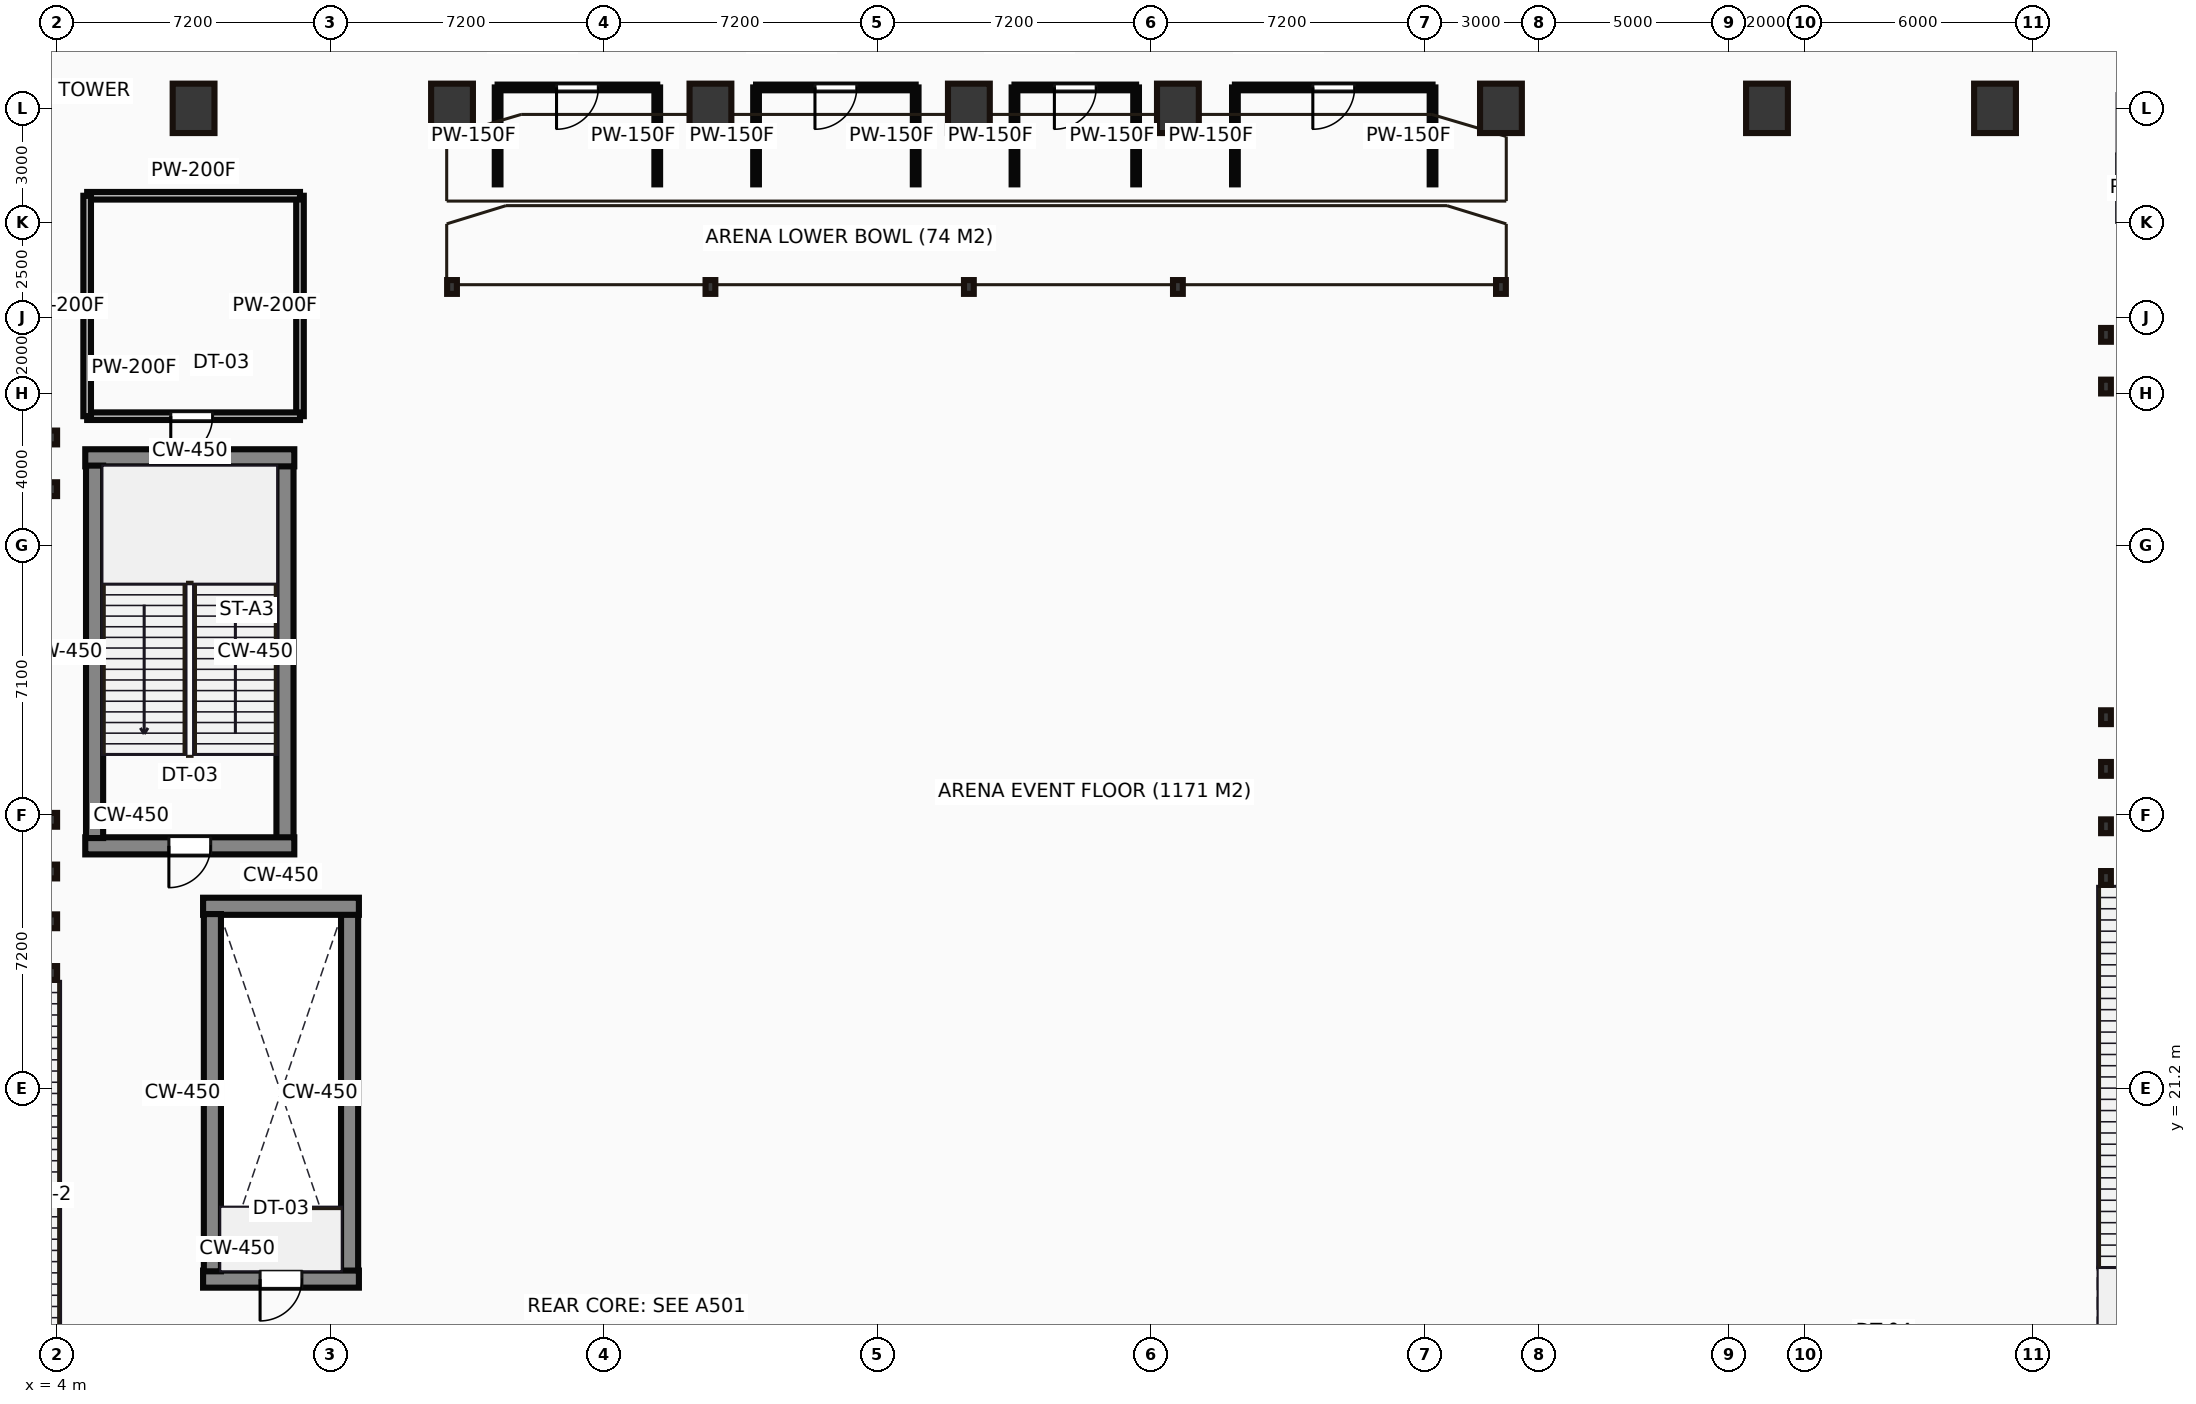
"""IFC4 building model, lengths in metres.
Left out: names, types, materials, properties, quantities, classifications, styles, units other than length and angle.
Written with IfcOpenShell. Run it as: python <this file> out.ifc"""

import sys

from ifc_helpers import new_model, si_unit, direction, frame, frame_2d, origin, origin_2d, place, context, subcontext, project, spatial, rectangle, hollow_rectangle, i_section, extrude, source, transform, mapped, element, fill, save


model = new_model("IFC4")
c1 = context("Model", 3, precision=1e-05, world=origin(), true_north=direction((0.0, 1.0)))
c2 = subcontext(c1, "Body", "Model", "MODEL_VIEW")
j1 = project(units=[si_unit("LENGTHUNIT", "METRE"), si_unit("PLANEANGLEUNIT", "RADIAN")], contexts=[c1])
p1 = place(None, origin())
s1 = spatial("IfcSite", under=j1, at=p1, CompositionType="ELEMENT")
p2 = place(p1, origin())
s2 = spatial("IfcBuilding", under=s1, at=p2, CompositionType="ELEMENT")
p3 = place(p2, origin())
s3 = spatial("IfcBuildingStorey", under=s2, at=p3, CompositionType="ELEMENT", Elevation=0.0)
m1 = source(origin(), c2, "Body", "SweptSolid", [
    extrude(hollow_rectangle(XDim=1.1, YDim=1.3, WallThickness=0.055, at=origin_2d()), origin(), (0.0, 0.0, 1.0), 6.0),
])
for number, where, z_axis, x_axis in (
    (1, (7.6, 47.0, 0.0), (0.0, 0.0, 1.0), (1.0, 0.0, 0.0)),
    (2, (14.4, 47.0, 0.0), (0.0, 0.0, 1.0), (1.0, 0.0, 0.0)),
    (3, (21.2, 47.0, 0.0), (0.0, 0.0, 1.0), (1.0, 0.0, 0.0)),
    (4, (28.0, 47.0, 0.0), (0.0, 0.0, 1.0), (1.0, 0.0, 0.0)),
    (5, (33.5, 47.0, 0.0), (0.0, 0.0, 1.0), (1.0, 0.0, 0.0)),
    (6, (42.0, 47.0, 0.0), (0.0, 0.0, 1.0), (1.0, 0.0, 0.0)),
    (7, (49.0, 47.0, 0.0), (0.0, 0.0, 1.0), (1.0, 0.0, 0.0)),
    (8, (55.0, 47.0, 0.0), (0.0, 0.0, 1.0), (1.0, 0.0, 0.0)),
):
    element("IfcColumn", number, at=place(p3, frame(where, z_axis=z_axis, x_axis=x_axis)), inside=s3, PredefinedType="PILASTER", context=c2, shape_type="MappedRepresentation", body=[
        mapped(m1, transform((0.0, 0.0, 0.0))),
    ])
m2 = source(origin(), c2, "Body", "SweptSolid", [
    extrude(i_section(OverallWidth=0.257, OverallDepth=0.363, WebThickness=0.013, FlangeThickness=0.022, at=origin_2d()), origin(), (0.0, 0.0, 1.0), 6.0),
])
for number, where, z_axis, x_axis in (
    (9, (14.4, 42.3, 0.0), (0.0, 0.0, 1.0), (1.0, 0.0, 0.0)),
    (10, (21.2, 42.3, 0.0), (0.0, 0.0, 1.0), (1.0, 0.0, 0.0)),
    (11, (28.0, 42.3, 0.0), (0.0, 0.0, 1.0), (1.0, 0.0, 0.0)),
    (12, (33.5, 42.3, 0.0), (0.0, 0.0, 1.0), (1.0, 0.0, 0.0)),
    (13, (42.0, 42.3, 0.0), (0.0, 0.0, 1.0), (1.0, 0.0, 0.0)),
):
    element("IfcColumn", number, at=place(p3, frame(where, z_axis=z_axis, x_axis=x_axis)), inside=s3, PredefinedType="COLUMN", context=c2, shape_type="MappedRepresentation", body=[
        mapped(m2, transform((0.0, 0.0, 0.0))),
    ])
m3 = source(origin(), c2, "Body", "SweptSolid", [
    extrude(rectangle(XDim=5.5, YDim=0.45, at=frame_2d((2.75, 0.0))), origin(), (0.0, 0.0, 1.0), 6.0),
])
p4 = place(p3, frame((4.75, 27.595, 0.0), z_axis=(0.0, 0.0, 1.0), x_axis=(1.0, 0.0, 0.0)))
e14 = element("IfcWall", 14, at=p4, inside=s3, PredefinedType="SHEAR", context=c2, shape_type="MappedRepresentation", body=[
    mapped(m3, transform((0.0, 0.0, 0.0))),
])
p5 = place(p4, frame((2.2, 0.0, 0.0)))
e15 = element("IfcOpeningElement", 15, at=p5, cuts=e14, PredefinedType="OPENING", context=c2, shape_type="SweptSolid", body=[
    extrude(rectangle(XDim=1.1, YDim=2.15, at=frame_2d((0.55, 1.075))), frame((0.0, 0.235, 0.0), z_axis=(0.0, -1.0, 0.0), x_axis=(1.0, 0.0, 0.0)), (0.0, 0.0, 1.0), 0.47),
])
m4 = source(origin(), c2, "Body", "SweptSolid", [
    extrude(rectangle(XDim=9.8, YDim=0.45, at=frame_2d((4.9, 0.0))), origin(), (0.0, 0.0, 1.0), 6.0),
])
for number, where, z_axis, x_axis in (
    (16, (4.995, 27.8, 0.0), (0.0, 0.0, 1.0), (0.0, 1.0, 0.0)),
    (17, (10.005, 27.8, 0.0), (0.0, 0.0, 1.0), (0.0, 1.0, 0.0)),
):
    element("IfcWall", number, at=place(p3, frame(where, z_axis=z_axis, x_axis=x_axis)), inside=s3, PredefinedType="SHEAR", context=c2, shape_type="MappedRepresentation", body=[
        mapped(m4, transform((0.0, 0.0, 0.0))),
    ])
p6 = place(p3, frame((4.75, 37.805, 0.0), z_axis=(0.0, 0.0, 1.0), x_axis=(1.0, 0.0, 0.0)))
e18 = element("IfcWall", 18, at=p6, inside=s3, PredefinedType="SHEAR", context=c2, shape_type="MappedRepresentation", body=[
    mapped(m3, transform((0.0, 0.0, 0.0))),
])
m5 = source(origin(), c2, "Body", "SweptSolid", [
    extrude(rectangle(XDim=4.1, YDim=0.45, at=frame_2d((2.05, 0.0))), origin(), (0.0, 0.0, 1.0), 5.7),
])
p7 = place(p3, frame((7.85, 16.195, 0.0), z_axis=(0.0, 0.0, 1.0), x_axis=(1.0, 0.0, 0.0)))
e19 = element("IfcWall", 19, at=p7, inside=s3, PredefinedType="SHEAR", context=c2, shape_type="MappedRepresentation", body=[
    mapped(m5, transform((0.0, 0.0, 0.0))),
])
p8 = place(p7, frame((1.5, 0.0, 0.0)))
e20 = element("IfcOpeningElement", 20, at=p8, cuts=e19, PredefinedType="OPENING", context=c2, shape_type="SweptSolid", body=[
    extrude(rectangle(XDim=1.1, YDim=2.15, at=frame_2d((0.55, 1.075))), frame((0.0, 0.235, 0.0), z_axis=(0.0, -1.0, 0.0), x_axis=(1.0, 0.0, 0.0)), (0.0, 0.0, 1.0), 0.47),
])
m6 = source(origin(), c2, "Body", "SweptSolid", [
    extrude(rectangle(XDim=9.4, YDim=0.45, at=frame_2d((4.7, 0.0))), origin(), (0.0, 0.0, 1.0), 5.7),
])
for number, where, z_axis, x_axis in (
    (21, (8.095, 16.4, 0.0), (0.0, 0.0, 1.0), (0.0, 1.0, 0.0)),
    (22, (11.705, 16.4, 0.0), (0.0, 0.0, 1.0), (0.0, 1.0, 0.0)),
):
    element("IfcWall", number, at=place(p3, frame(where, z_axis=z_axis, x_axis=x_axis)), inside=s3, PredefinedType="SHEAR", context=c2, shape_type="MappedRepresentation", body=[
        mapped(m6, transform((0.0, 0.0, 0.0))),
    ])
p9 = place(p3, frame((7.85, 26.005, 0.0), z_axis=(0.0, 0.0, 1.0), x_axis=(1.0, 0.0, 0.0)))
e23 = element("IfcWall", 23, at=p9, inside=s3, PredefinedType="SHEAR", context=c2, shape_type="MappedRepresentation", body=[
    mapped(m5, transform((0.0, 0.0, 0.0))),
])
m7 = source(origin(), c2, "Body", "SweptSolid", [
    extrude(i_section(OverallWidth=0.257, OverallDepth=0.363, WebThickness=0.013, FlangeThickness=0.022, at=origin_2d()), origin(), (0.0, 0.0, 1.0), 5.8),
])
for number, where, z_axis, x_axis in (
    (24, (3.88, 24.25, 0.0), (0.0, 0.0, 1.0), (1.0, 0.0, 0.0)),
    (25, (3.88, 25.61, 0.0), (0.0, 0.0, 1.0), (1.0, 0.0, 0.0)),
    (26, (3.88, 26.92, 0.0), (0.0, 0.0, 1.0), (1.0, 0.0, 0.0)),
    (27, (3.88, 28.28, 0.0), (0.0, 0.0, 1.0), (1.0, 0.0, 0.0)),
):
    element("IfcColumn", number, at=place(p3, frame(where, z_axis=z_axis, x_axis=x_axis)), inside=s3, PredefinedType="COLUMN", context=c2, shape_type="MappedRepresentation", body=[
        mapped(m7, transform((0.0, 0.0, 0.0))),
    ])
for number, where, z_axis, x_axis in (
    (28, (3.88, 36.98, 0.0), (0.0, 0.0, 1.0), (1.0, 0.0, 0.0)),
    (29, (3.88, 38.34, 0.0), (0.0, 0.0, 1.0), (1.0, 0.0, 0.0)),
):
    element("IfcColumn", number, at=place(p3, frame(where, z_axis=z_axis, x_axis=x_axis)), inside=s3, PredefinedType="COLUMN", context=c2, shape_type="MappedRepresentation", body=[
        mapped(m2, transform((0.0, 0.0, 0.0))),
    ])
for number, where, z_axis, x_axis in (
    (30, (57.92, 26.75, 0.0), (0.0, 0.0, 1.0), (1.0, 0.0, 0.0)),
    (31, (57.92, 28.11, 0.0), (0.0, 0.0, 1.0), (1.0, 0.0, 0.0)),
    (32, (57.92, 29.62, 0.0), (0.0, 0.0, 1.0), (1.0, 0.0, 0.0)),
    (33, (57.92, 30.98, 0.0), (0.0, 0.0, 1.0), (1.0, 0.0, 0.0)),
):
    element("IfcColumn", number, at=place(p3, frame(where, z_axis=z_axis, x_axis=x_axis)), inside=s3, PredefinedType="COLUMN", context=c2, shape_type="MappedRepresentation", body=[
        mapped(m7, transform((0.0, 0.0, 0.0))),
    ])
for number, where, z_axis, x_axis in (
    (34, (57.92, 39.68, 0.0), (0.0, 0.0, 1.0), (1.0, 0.0, 0.0)),
    (35, (57.92, 41.04, 0.0), (0.0, 0.0, 1.0), (1.0, 0.0, 0.0)),
):
    element("IfcColumn", number, at=place(p3, frame(where, z_axis=z_axis, x_axis=x_axis)), inside=s3, PredefinedType="COLUMN", context=c2, shape_type="MappedRepresentation", body=[
        mapped(m2, transform((0.0, 0.0, 0.0))),
    ])
m8 = source(origin(), c2, "Body", "SweptSolid", [
    extrude(rectangle(XDim=5.6, YDim=0.2, at=frame_2d((2.8, 0.0))), origin(), (0.0, 0.0, 1.0), 5.7),
])
p10 = place(p3, frame((4.8, 38.9, 0.0), z_axis=(0.0, 0.0, 1.0), x_axis=(1.0, 0.0, 0.0)))
e36 = element("IfcWall", 36, at=p10, inside=s3, PredefinedType="PARTITIONING", context=c2, shape_type="MappedRepresentation", body=[
    mapped(m8, transform((0.0, 0.0, 0.0))),
])
p11 = place(p10, frame((2.2, 0.0, 0.0)))
e37 = element("IfcOpeningElement", 37, at=p11, cuts=e36, PredefinedType="OPENING", context=c2, shape_type="SweptSolid", body=[
    extrude(rectangle(XDim=1.1, YDim=2.15, at=frame_2d((0.55, 1.075))), frame((0.0, 0.11, 0.0), z_axis=(0.0, -1.0, 0.0), x_axis=(1.0, 0.0, 0.0)), (0.0, 0.0, 1.0), 0.22),
])
m9 = source(origin(), c2, "Body", "SweptSolid", [
    extrude(rectangle(XDim=5.8, YDim=0.2, at=frame_2d((2.9, 0.0))), origin(), (0.0, 0.0, 1.0), 5.7),
])
p12 = place(p3, frame((10.4, 38.9, 0.0), z_axis=(0.0, 0.0, 1.0), x_axis=(0.0, 1.0, 0.0)))
e38 = element("IfcWall", 38, at=p12, inside=s3, PredefinedType="PARTITIONING", context=c2, shape_type="MappedRepresentation", body=[
    mapped(m9, transform((0.0, 0.0, 0.0))),
])
p13 = place(p3, frame((4.8, 44.7, 0.0), z_axis=(0.0, 0.0, 1.0), x_axis=(1.0, 0.0, 0.0)))
e39 = element("IfcWall", 39, at=p13, inside=s3, PredefinedType="PARTITIONING", context=c2, shape_type="MappedRepresentation", body=[
    mapped(m8, transform((0.0, 0.0, 0.0))),
])
p14 = place(p3, frame((4.8, 38.9, 0.0), z_axis=(0.0, 0.0, 1.0), x_axis=(0.0, 1.0, 0.0)))
e40 = element("IfcWall", 40, at=p14, inside=s3, PredefinedType="PARTITIONING", context=c2, shape_type="MappedRepresentation", body=[
    mapped(m9, transform((0.0, 0.0, 0.0))),
])
m10 = source(origin(), c2, "Body", "SweptSolid", [
    extrude(rectangle(XDim=2.55, YDim=0.15, at=frame_2d((1.275, 0.0))), origin(), (0.0, 0.0, 1.0), 5.7),
])
for number, where, z_axis, x_axis in (
    (41, (15.6, 45.0, 0.0), (0.0, 0.0, 1.0), (0.0, 1.0, 0.0)),
    (42, (19.8, 45.0, 0.0), (0.0, 0.0, 1.0), (0.0, 1.0, 0.0)),
):
    element("IfcWall", number, at=place(p3, frame(where, z_axis=z_axis, x_axis=x_axis)), inside=s3, PredefinedType="PARTITIONING", context=c2, shape_type="MappedRepresentation", body=[
        mapped(m10, transform((0.0, 0.0, 0.0))),
    ])
m11 = source(origin(), c2, "Body", "SweptSolid", [
    extrude(rectangle(XDim=4.2, YDim=0.15, at=frame_2d((2.1, 0.0))), origin(), (0.0, 0.0, 1.0), 5.7),
])
p15 = place(p3, frame((15.6, 47.55, 0.0), z_axis=(0.0, 0.0, 1.0), x_axis=(1.0, 0.0, 0.0)))
e43 = element("IfcWall", 43, at=p15, inside=s3, PredefinedType="PARTITIONING", context=c2, shape_type="MappedRepresentation", body=[
    mapped(m11, transform((0.0, 0.0, 0.0))),
])
p16 = place(p15, frame((1.55, 0.0, 0.0)))
e44 = element("IfcOpeningElement", 44, at=p16, cuts=e43, PredefinedType="OPENING", context=c2, shape_type="SweptSolid", body=[
    extrude(rectangle(XDim=1.1, YDim=2.15, at=frame_2d((0.55, 1.075))), frame((0.0, 0.085, 0.0), z_axis=(0.0, -1.0, 0.0), x_axis=(1.0, 0.0, 0.0)), (0.0, 0.0, 1.0), 0.17),
])
for number, where, z_axis, x_axis in (
    (45, (22.4, 45.0, 0.0), (0.0, 0.0, 1.0), (0.0, 1.0, 0.0)),
    (46, (26.6, 45.0, 0.0), (0.0, 0.0, 1.0), (0.0, 1.0, 0.0)),
):
    element("IfcWall", number, at=place(p3, frame(where, z_axis=z_axis, x_axis=x_axis)), inside=s3, PredefinedType="PARTITIONING", context=c2, shape_type="MappedRepresentation", body=[
        mapped(m10, transform((0.0, 0.0, 0.0))),
    ])
m12 = source(origin(), c2, "Body", "SweptSolid", [
    extrude(rectangle(XDim=4.2, YDim=0.15, at=frame_2d((2.1, 0.0))), origin(), (0.0, 0.0, 1.0), 5.7),
])
p17 = place(p3, frame((22.4, 47.55, 0.0), z_axis=(0.0, 0.0, 1.0), x_axis=(1.0, 0.0, 0.0)))
e47 = element("IfcWall", 47, at=p17, inside=s3, PredefinedType="PARTITIONING", context=c2, shape_type="MappedRepresentation", body=[
    mapped(m12, transform((0.0, 0.0, 0.0))),
])
p18 = place(p17, frame((1.55, 0.0, 0.0)))
e48 = element("IfcOpeningElement", 48, at=p18, cuts=e47, PredefinedType="OPENING", context=c2, shape_type="SweptSolid", body=[
    extrude(rectangle(XDim=1.1, YDim=2.15, at=frame_2d((0.55, 1.075))), frame((0.0, 0.085, 0.0), z_axis=(0.0, -1.0, 0.0), x_axis=(1.0, 0.0, 0.0)), (0.0, 0.0, 1.0), 0.17),
])
for number, where, z_axis, x_axis in (
    (49, (29.2, 45.0, 0.0), (0.0, 0.0, 1.0), (0.0, 1.0, 0.0)),
    (50, (32.4, 45.0, 0.0), (0.0, 0.0, 1.0), (0.0, 1.0, 0.0)),
):
    element("IfcWall", number, at=place(p3, frame(where, z_axis=z_axis, x_axis=x_axis)), inside=s3, PredefinedType="PARTITIONING", context=c2, shape_type="MappedRepresentation", body=[
        mapped(m10, transform((0.0, 0.0, 0.0))),
    ])
m13 = source(origin(), c2, "Body", "SweptSolid", [
    extrude(rectangle(XDim=3.2, YDim=0.15, at=frame_2d((1.6, 0.0))), origin(), (0.0, 0.0, 1.0), 5.7),
])
p19 = place(p3, frame((29.2, 47.55, 0.0), z_axis=(0.0, 0.0, 1.0), x_axis=(1.0, 0.0, 0.0)))
e51 = element("IfcWall", 51, at=p19, inside=s3, PredefinedType="PARTITIONING", context=c2, shape_type="MappedRepresentation", body=[
    mapped(m13, transform((0.0, 0.0, 0.0))),
])
p20 = place(p19, frame((1.05, 0.0, 0.0)))
e52 = element("IfcOpeningElement", 52, at=p20, cuts=e51, PredefinedType="OPENING", context=c2, shape_type="SweptSolid", body=[
    extrude(rectangle(XDim=1.1, YDim=2.15, at=frame_2d((0.55, 1.075))), frame((0.0, 0.085, 0.0), z_axis=(0.0, -1.0, 0.0), x_axis=(1.0, 0.0, 0.0)), (0.0, 0.0, 1.0), 0.17),
])
for number, where, z_axis, x_axis in (
    (53, (35.0, 45.0, 0.0), (0.0, 0.0, 1.0), (0.0, 1.0, 0.0)),
    (54, (40.2, 45.0, 0.0), (0.0, 0.0, 1.0), (0.0, 1.0, 0.0)),
):
    element("IfcWall", number, at=place(p3, frame(where, z_axis=z_axis, x_axis=x_axis)), inside=s3, PredefinedType="PARTITIONING", context=c2, shape_type="MappedRepresentation", body=[
        mapped(m10, transform((0.0, 0.0, 0.0))),
    ])
m14 = source(origin(), c2, "Body", "SweptSolid", [
    extrude(rectangle(XDim=5.2, YDim=0.15, at=frame_2d((2.6, 0.0))), origin(), (0.0, 0.0, 1.0), 5.7),
])
p21 = place(p3, frame((35.0, 47.55, 0.0), z_axis=(0.0, 0.0, 1.0), x_axis=(1.0, 0.0, 0.0)))
e55 = element("IfcWall", 55, at=p21, inside=s3, PredefinedType="PARTITIONING", context=c2, shape_type="MappedRepresentation", body=[
    mapped(m14, transform((0.0, 0.0, 0.0))),
])
p22 = place(p21, frame((2.05, 0.0, 0.0)))
e56 = element("IfcOpeningElement", 56, at=p22, cuts=e55, PredefinedType="OPENING", context=c2, shape_type="SweptSolid", body=[
    extrude(rectangle(XDim=1.1, YDim=2.15, at=frame_2d((0.55, 1.075))), frame((0.0, 0.085, 0.0), z_axis=(0.0, -1.0, 0.0), x_axis=(1.0, 0.0, 0.0)), (0.0, 0.0, 1.0), 0.17),
])
m15 = source(origin(), c2, "Body", "SweptSolid", [
    extrude(rectangle(XDim=1.1, YDim=2.15, at=frame_2d((0.55, 1.075))), frame((0.0, 0.025, 0.0), z_axis=(0.0, -1.0, 0.0), x_axis=(1.0, 0.0, 0.0)), (0.0, 0.0, 1.0), 0.05),
])
p23 = place(p11, origin())
e57 = element("IfcDoor", 57, at=p23, inside=s3, OperationType="SINGLE_SWING_LEFT", PredefinedType="DOOR", context=c2, shape_type="MappedRepresentation", body=[
    mapped(m15, transform((0.0, 0.0, 0.0))),
])
fill(e37, e57)
p24 = place(p16, frame((1.1, 0.0, 0.0), z_axis=(0.0, 0.0, 1.0), x_axis=(-1.0, 0.0, 0.0)))
e58 = element("IfcDoor", 58, at=p24, inside=s3, OperationType="SINGLE_SWING_LEFT", PredefinedType="DOOR", context=c2, shape_type="MappedRepresentation", body=[
    mapped(m15, transform((0.0, 0.0, 0.0))),
])
fill(e44, e58)
p25 = place(p18, frame((1.1, 0.0, 0.0), z_axis=(0.0, 0.0, 1.0), x_axis=(-1.0, 0.0, 0.0)))
e59 = element("IfcDoor", 59, at=p25, inside=s3, OperationType="SINGLE_SWING_LEFT", PredefinedType="DOOR", context=c2, shape_type="MappedRepresentation", body=[
    mapped(m15, transform((0.0, 0.0, 0.0))),
])
fill(e48, e59)
p26 = place(p20, frame((1.1, 0.0, 0.0), z_axis=(0.0, 0.0, 1.0), x_axis=(-1.0, 0.0, 0.0)))
e60 = element("IfcDoor", 60, at=p26, inside=s3, OperationType="SINGLE_SWING_LEFT", PredefinedType="DOOR", context=c2, shape_type="MappedRepresentation", body=[
    mapped(m15, transform((0.0, 0.0, 0.0))),
])
fill(e52, e60)
p27 = place(p22, frame((1.1, 0.0, 0.0), z_axis=(0.0, 0.0, 1.0), x_axis=(-1.0, 0.0, 0.0)))
e61 = element("IfcDoor", 61, at=p27, inside=s3, OperationType="SINGLE_SWING_LEFT", PredefinedType="DOOR", context=c2, shape_type="MappedRepresentation", body=[
    mapped(m15, transform((0.0, 0.0, 0.0))),
])
fill(e56, e61)
p28 = place(p5, frame((1.1, 0.0, 0.0), z_axis=(0.0, 0.0, 1.0), x_axis=(-1.0, 0.0, 0.0)))
e62 = element("IfcDoor", 62, at=p28, inside=s3, OperationType="SINGLE_SWING_LEFT", PredefinedType="DOOR", context=c2, shape_type="MappedRepresentation", body=[
    mapped(m15, transform((0.0, 0.0, 0.0))),
])
fill(e15, e62)
p29 = place(p8, frame((1.1, 0.0, 0.0), z_axis=(0.0, 0.0, 1.0), x_axis=(-1.0, 0.0, 0.0)))
e63 = element("IfcDoor", 63, at=p29, inside=s3, OperationType="SINGLE_SWING_LEFT", PredefinedType="DOOR", context=c2, shape_type="MappedRepresentation", body=[
    mapped(m15, transform((0.0, 0.0, 0.0))),
])
fill(e20, e63)
save(model, sys.argv[1])
